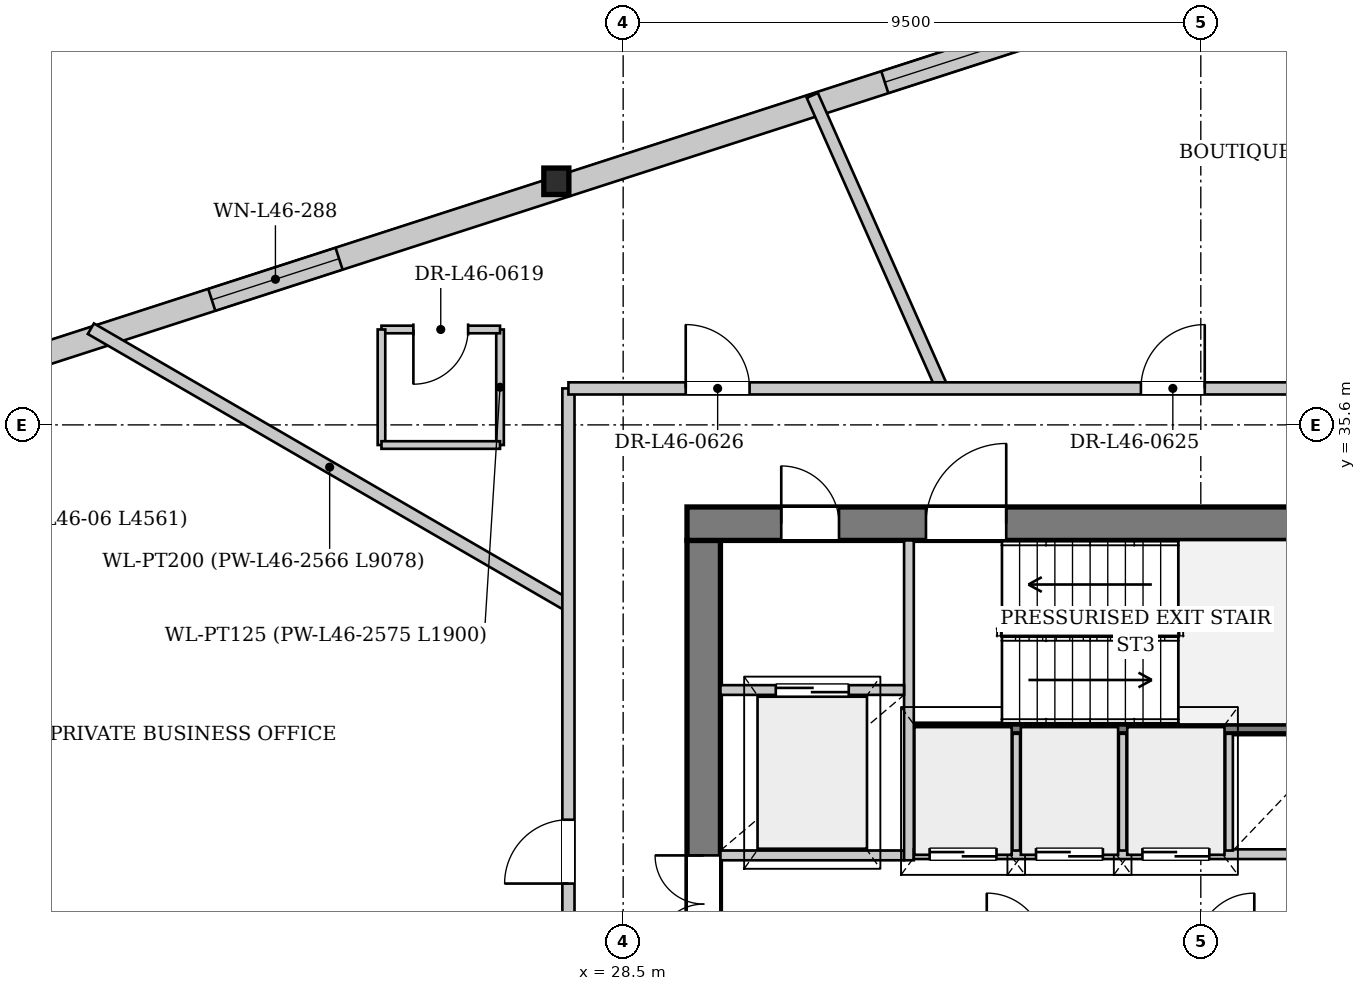
"""IFC4 building model, lengths in metres.
Left out: names, types, materials, properties, quantities, classifications, styles, units other than length and angle.
Written with IfcOpenShell. Run it as: python <this file> out.ifc"""

import sys

from ifc_helpers import new_model, si_unit, direction, frame, frame_2d, origin, origin_2d, place, context, subcontext, project, spatial, rectangle, i_section, extrude, source, transform, mapped, element, fill, save


model = new_model("IFC4")
c1 = context("Model", 3, precision=1e-05, world=origin(), true_north=direction((0.0, 1.0)))
c2 = subcontext(c1, "Body", "Model", "MODEL_VIEW")
j1 = project(units=[si_unit("LENGTHUNIT", "METRE"), si_unit("PLANEANGLEUNIT", "RADIAN")], contexts=[c1])
p1 = place(None, origin())
s1 = spatial("IfcSite", under=j1, at=p1, CompositionType="ELEMENT")
p2 = place(p1, origin())
s2 = spatial("IfcBuilding", under=s1, at=p2, CompositionType="ELEMENT")
p3 = place(p2, frame((0.0, 0.0, 175.0)))
s3 = spatial("IfcBuildingStorey", under=s2, at=p3, CompositionType="ELEMENT", Elevation=175.0)
m1 = source(origin(), c2, "Body", "SweptSolid", [
    extrude(i_section(OverallWidth=0.412, OverallDepth=0.435, WebThickness=0.031, FlangeThickness=0.05, at=origin_2d()), origin(), (0.0, 0.0, 1.0), 3.398),
])
p4 = place(p3, frame((27.496, 39.719, 0.0), z_axis=(-0.055972402112, -0.066390885175, 0.996222535665), x_axis=(0.764546308451, -0.644568803337, 0.0)))
e1 = element("IfcColumn", 1, at=p4, inside=s3, PredefinedType="COLUMN", context=c2, shape_type="MappedRepresentation", body=[
    mapped(m1, transform((0.0, 0.0, 0.0), x_axis=(1.0, 0.0, 0.0), y_axis=(0.0, 1.0, 0.0), z_axis=(0.0, 0.0, 1.0), scale=1.0)),
])
p5 = place(p3, frame((22.161, 15.73, 0.0), z_axis=(0.0, 0.0, 1.0), x_axis=(-0.401254224354, 0.915966728347, 0.0)))
e2 = element("IfcWall", 2, at=p5, inside=s3, PredefinedType="SOLIDWALL", context=c2, shape_type="SweptSolid", body=[
    extrude(rectangle(XDim=17.854, YDim=0.32, at=frame_2d((8.927, 0.0))), origin(), (0.0, 0.0, 1.0), 2.722),
])
p6 = place(p5, frame((4.963, 0.0, 0.0)))
e3 = element("IfcOpeningElement", 3, at=p6, cuts=e2, PredefinedType="OPENING", context=c2, shape_type="SweptSolid", body=[
    extrude(rectangle(XDim=1.5, YDim=2.3, at=frame_2d((0.75, 1.15))), frame((0.0, 0.17, 0.0), z_axis=(0.0, -1.0, 0.0), x_axis=(1.0, 0.0, 0.0)), (0.0, 0.0, 1.0), 0.34),
])
p7 = place(p5, frame((11.912, 0.0, 0.252)))
e4 = element("IfcOpeningElement", 4, at=p7, cuts=e2, PredefinedType="OPENING", context=c2, shape_type="SweptSolid", body=[
    extrude(rectangle(XDim=2.6, YDim=2.35, at=frame_2d((1.3, 1.175))), frame((0.0, 0.17, 0.0), z_axis=(0.0, -1.0, 0.0), x_axis=(1.0, 0.0, 0.0)), (0.0, 0.0, 1.0), 0.34),
])
p8 = place(p3, frame((16.706, 36.031, 0.0), z_axis=(0.0, 0.0, 1.0), x_axis=(0.95149688804, 0.307658369056, 0.0)))
e5 = element("IfcWall", 5, at=p8, inside=s3, PredefinedType="SOLIDWALL", context=c2, shape_type="SweptSolid", body=[
    extrude(rectangle(XDim=22.803, YDim=0.38, at=frame_2d((11.402, 0.0))), origin(), (0.0, 0.0, 1.0), 2.722),
])
p9 = place(p8, frame((5.285, 0.0, 0.352)))
e6 = element("IfcOpeningElement", 6, at=p9, cuts=e5, PredefinedType="OPENING", context=c2, shape_type="SweptSolid", body=[
    extrude(rectangle(XDim=2.2, YDim=2.25, at=frame_2d((1.1, 1.125))), frame((0.0, 0.2, 0.0), z_axis=(0.0, -1.0, 0.0), x_axis=(1.0, 0.0, 0.0)), (0.0, 0.0, 1.0), 0.4),
])
p10 = place(p8, frame((16.918, 0.0, 0.352)))
e7 = element("IfcOpeningElement", 7, at=p10, cuts=e5, PredefinedType="OPENING", context=c2, shape_type="SweptSolid", body=[
    extrude(rectangle(XDim=2.2, YDim=2.25, at=frame_2d((1.1, 1.125))), frame((0.0, 0.2, 0.0), z_axis=(0.0, -1.0, 0.0), x_axis=(1.0, 0.0, 0.0)), (0.0, 0.0, 1.0), 0.4),
])
p11 = place(p3, frame((29.825, 19.5, 0.0), z_axis=(0.0, 0.0, 1.0), x_axis=(0.0, 1.0, 0.0)))
e8 = element("IfcWall", 8, at=p11, inside=s3, PredefinedType="SHEAR", context=c2, shape_type="SweptSolid", body=[
    extrude(rectangle(XDim=14.2, YDim=0.55, at=frame_2d((7.1, 0.0))), origin(), (0.0, 0.0, 1.0), 3.33),
])
p12 = place(p11, frame((7.42, 0.0, 0.0)))
e9 = element("IfcOpeningElement", 9, at=p12, cuts=e8, PredefinedType="OPENING", context=c2, shape_type="SweptSolid", body=[
    extrude(rectangle(XDim=1.6, YDim=2.2, at=frame_2d((0.8, 1.1))), frame((0.0, 0.285, 0.0), z_axis=(0.0, -1.0, 0.0), x_axis=(1.0, 0.0, 0.0)), (0.0, 0.0, 1.0), 0.57),
])
p13 = place(p3, frame((29.55, 33.975, 0.0), z_axis=(0.0, 0.0, 1.0), x_axis=(1.0, 0.0, 0.0)))
e10 = element("IfcWall", 10, at=p13, inside=s3, PredefinedType="SHEAR", context=c2, shape_type="SweptSolid", body=[
    extrude(rectangle(XDim=16.9, YDim=0.55, at=frame_2d((8.45, 0.0))), origin(), (0.0, 0.0, 1.0), 3.33),
])
p14 = place(p13, frame((1.55, 0.0, 0.0)))
e11 = element("IfcOpeningElement", 11, at=p14, cuts=e10, PredefinedType="OPENING", context=c2, shape_type="SweptSolid", body=[
    extrude(rectangle(XDim=0.95, YDim=2.1, at=frame_2d((0.475, 1.05))), frame((0.0, 0.285, 0.0), z_axis=(0.0, -1.0, 0.0), x_axis=(1.0, 0.0, 0.0)), (0.0, 0.0, 1.0), 0.57),
])
p15 = place(p13, frame((3.93, 0.0, 0.0)))
e12 = element("IfcOpeningElement", 12, at=p15, cuts=e10, PredefinedType="OPENING", context=c2, shape_type="SweptSolid", body=[
    extrude(rectangle(XDim=1.32, YDim=2.2, at=frame_2d((0.66, 1.1))), frame((0.0, 0.285, 0.0), z_axis=(0.0, -1.0, 0.0), x_axis=(1.0, 0.0, 0.0)), (0.0, 0.0, 1.0), 0.57),
])
p16 = place(p3, frame((33.28, 30.6, 0.0), z_axis=(0.0, 0.0, 1.0), x_axis=(1.0, 0.0, 0.0)))
e13 = element("IfcWall", 13, at=p16, inside=s3, PredefinedType="PARTITIONING", context=c2, shape_type="SweptSolid", body=[
    extrude(rectangle(XDim=7.3, YDim=0.16, at=frame_2d((3.65, 0.0))), origin(), (0.0, 0.0, 1.0), 3.33),
])
p17 = place(p3, frame((30.1, 28.52, 0.0), z_axis=(0.0, 0.0, 1.0), x_axis=(1.0, 0.0, 0.0)))
e14 = element("IfcWall", 14, at=p17, inside=s3, PredefinedType="PARTITIONING", context=c2, shape_type="SweptSolid", body=[
    extrude(rectangle(XDim=3.02, YDim=0.16, at=frame_2d((1.51, 0.0))), origin(), (0.0, 0.0, 1.0), 3.33),
])
p18 = place(p3, frame((33.2, 28.44, 0.0), z_axis=(0.0, 0.0, 1.0), x_axis=(0.0, 1.0, 0.0)))
e15 = element("IfcWall", 15, at=p18, inside=s3, PredefinedType="PARTITIONING", context=c2, shape_type="SweptSolid", body=[
    extrude(rectangle(XDim=5.26, YDim=0.16, at=frame_2d((2.63, 0.0))), origin(), (0.0, 0.0, 1.0), 3.33),
])
p19 = place(p3, frame((30.1, 31.24, 0.0), z_axis=(0.0, 0.0, 1.0), x_axis=(1.0, 0.0, 0.0)))
e16 = element("IfcWall", 16, at=p19, inside=s3, PredefinedType="PARTITIONING", context=c2, shape_type="SweptSolid", body=[
    extrude(rectangle(XDim=3.02, YDim=0.16, at=frame_2d((1.51, 0.0))), origin(), (0.0, 0.0, 1.0), 3.33),
])
p20 = place(p19, frame((0.91, 0.0, 0.0)))
e17 = element("IfcOpeningElement", 17, at=p20, cuts=e16, PredefinedType="OPENING", context=c2, shape_type="SweptSolid", body=[
    extrude(rectangle(XDim=1.2, YDim=2.2, at=frame_2d((0.6, 1.1))), frame((0.0, 0.09, 0.0), z_axis=(0.0, -1.0, 0.0), x_axis=(1.0, 0.0, 0.0)), (0.0, 0.0, 1.0), 0.18),
])
p21 = place(p3, frame((33.28, 28.54, 0.0), z_axis=(0.0, 0.0, 1.0), x_axis=(1.0, 0.0, 0.0)))
e18 = element("IfcWall", 18, at=p21, inside=s3, PredefinedType="PARTITIONING", context=c2, shape_type="SweptSolid", body=[
    extrude(rectangle(XDim=12.62, YDim=0.16, at=frame_2d((6.31, 0.0))), origin(), (0.0, 0.0, 1.0), 3.33),
])
p22 = place(p21, frame((0.26, 0.0, 0.0)))
e19 = element("IfcOpeningElement", 19, at=p22, cuts=e18, PredefinedType="OPENING", context=c2, shape_type="SweptSolid", body=[
    extrude(rectangle(XDim=1.1, YDim=2.2, at=frame_2d((0.55, 1.1))), frame((0.0, 0.09, 0.0), z_axis=(0.0, -1.0, 0.0), x_axis=(1.0, 0.0, 0.0)), (0.0, 0.0, 1.0), 0.18),
])
p23 = place(p21, frame((2.01, 0.0, 0.0)))
e20 = element("IfcOpeningElement", 20, at=p23, cuts=e18, PredefinedType="OPENING", context=c2, shape_type="SweptSolid", body=[
    extrude(rectangle(XDim=1.1, YDim=2.2, at=frame_2d((0.55, 1.1))), frame((0.0, 0.09, 0.0), z_axis=(0.0, -1.0, 0.0), x_axis=(1.0, 0.0, 0.0)), (0.0, 0.0, 1.0), 0.18),
])
p24 = place(p21, frame((3.76, 0.0, 0.0)))
e21 = element("IfcOpeningElement", 21, at=p24, cuts=e18, PredefinedType="OPENING", context=c2, shape_type="SweptSolid", body=[
    extrude(rectangle(XDim=1.1, YDim=2.2, at=frame_2d((0.55, 1.1))), frame((0.0, 0.09, 0.0), z_axis=(0.0, -1.0, 0.0), x_axis=(1.0, 0.0, 0.0)), (0.0, 0.0, 1.0), 0.18),
])
for number, where, z_axis, x_axis in (
    (22, (34.965, 28.6, 0.0), (0.0, 0.0, 1.0), (0.0, 1.0, 0.0)),
    (23, (36.715, 28.6, 0.0), (0.0, 0.0, 1.0), (0.0, 1.0, 0.0)),
    (24, (38.465, 28.6, 0.0), (0.0, 0.0, 1.0), (0.0, 1.0, 0.0)),
):
    element("IfcWall", number, at=place(p3, frame(where, z_axis=z_axis, x_axis=x_axis)), inside=s3, PredefinedType="PARTITIONING", context=c2, shape_type="SweptSolid", body=[
        extrude(rectangle(XDim=1.92, YDim=0.125, at=frame_2d((0.96, 0.0))), origin(), (0.0, 0.0, 1.0), 3.33),
    ])
p25 = place(p3, frame((27.6, 32.629, 0.0), z_axis=(0.0, 0.0, 1.0), x_axis=(-0.865149978603, 0.501513224674, 0.0)))
e25 = element("IfcWall", 25, at=p25, inside=s3, PredefinedType="PARTITIONING", context=c2, shape_type="SweptSolid", body=[
    extrude(rectangle(XDim=9.078, YDim=0.2, at=frame_2d((4.539, 0.0))), origin(), (0.0, 0.0, 1.0), 3.33),
])
p26 = place(p3, frame((33.746, 36.2, 0.0), z_axis=(0.0, 0.0, 1.0), x_axis=(-0.40512810206, 0.914259930721, 0.0)))
e26 = element("IfcWall", 26, at=p26, inside=s3, PredefinedType="PARTITIONING", context=c2, shape_type="SweptSolid", body=[
    extrude(rectangle(XDim=5.27, YDim=0.2, at=frame_2d((2.635, 0.0))), origin(), (0.0, 0.0, 1.0), 3.33),
])
p27 = place(p3, frame((26.475, 35.269, 0.0), z_axis=(0.0, 0.0, 1.0), x_axis=(0.0, 1.0, 0.0)))
e27 = element("IfcWall", 27, at=p27, inside=s3, PredefinedType="PARTITIONING", context=c2, shape_type="SweptSolid", body=[
    extrude(rectangle(XDim=1.9, YDim=0.125, at=frame_2d((0.95, 0.0))), origin(), (0.0, 0.0, 1.0), 3.33),
])
p28 = place(p3, frame((26.475, 37.169, 0.0), z_axis=(0.0, 0.0, 1.0), x_axis=(-1.0, 0.0, 0.0)))
e28 = element("IfcWall", 28, at=p28, inside=s3, PredefinedType="PARTITIONING", context=c2, shape_type="SweptSolid", body=[
    extrude(rectangle(XDim=1.95, YDim=0.125, at=frame_2d((0.975, 0.0))), origin(), (0.0, 0.0, 1.0), 3.33),
])
p29 = place(p28, frame((0.525, 0.0, 0.0)))
e29 = element("IfcOpeningElement", 29, at=p29, cuts=e28, PredefinedType="OPENING", context=c2, shape_type="SweptSolid", body=[
    extrude(rectangle(XDim=0.9, YDim=2.1, at=frame_2d((0.45, 1.05))), frame((0.0, 0.073, 0.0), z_axis=(0.0, -1.0, 0.0), x_axis=(1.0, 0.0, 0.0)), (0.0, 0.0, 1.0), 0.145),
])
p30 = place(p3, frame((24.525, 37.169, 0.0), z_axis=(0.0, 0.0, 1.0), x_axis=(0.0, -1.0, 0.0)))
e30 = element("IfcWall", 30, at=p30, inside=s3, PredefinedType="PARTITIONING", context=c2, shape_type="SweptSolid", body=[
    extrude(rectangle(XDim=1.9, YDim=0.125, at=frame_2d((0.95, 0.0))), origin(), (0.0, 0.0, 1.0), 3.33),
])
p31 = place(p3, frame((24.525, 35.269, 0.0), z_axis=(0.0, 0.0, 1.0), x_axis=(1.0, 0.0, 0.0)))
e31 = element("IfcWall", 31, at=p31, inside=s3, PredefinedType="PARTITIONING", context=c2, shape_type="SweptSolid", body=[
    extrude(rectangle(XDim=1.95, YDim=0.125, at=frame_2d((0.975, 0.0))), origin(), (0.0, 0.0, 1.0), 3.33),
])
p32 = place(p3, frame((27.6, 17.0, 0.0), z_axis=(0.0, 0.0, 1.0), x_axis=(0.0, 1.0, 0.0)))
e32 = element("IfcWall", 32, at=p32, inside=s3, PredefinedType="PARTITIONING", context=c2, shape_type="SweptSolid", body=[
    extrude(rectangle(XDim=19.2, YDim=0.2, at=frame_2d((9.6, 0.0))), origin(), (0.0, 0.0, 1.0), 3.33),
])
p33 = place(p32, frame((11.057, 0.0, 0.0)))
e33 = element("IfcOpeningElement", 33, at=p33, cuts=e32, PredefinedType="OPENING", context=c2, shape_type="SweptSolid", body=[
    extrude(rectangle(XDim=1.05, YDim=2.2, at=frame_2d((0.525, 1.1))), frame((0.0, 0.11, 0.0), z_axis=(0.0, -1.0, 0.0), x_axis=(1.0, 0.0, 0.0)), (0.0, 0.0, 1.0), 0.22),
])
p34 = place(p32, frame((2.94, 0.0, 0.0)))
e34 = element("IfcOpeningElement", 34, at=p34, cuts=e32, PredefinedType="OPENING", context=c2, shape_type="SweptSolid", body=[
    extrude(rectangle(XDim=1.05, YDim=2.2, at=frame_2d((0.525, 1.1))), frame((0.0, 0.11, 0.0), z_axis=(0.0, -1.0, 0.0), x_axis=(1.0, 0.0, 0.0)), (0.0, 0.0, 1.0), 0.22),
])
p35 = place(p3, frame((27.6, 36.2, 0.0), z_axis=(0.0, 0.0, 1.0), x_axis=(1.0, 0.0, 0.0)))
e35 = element("IfcWall", 35, at=p35, inside=s3, PredefinedType="PARTITIONING", context=c2, shape_type="SweptSolid", body=[
    extrude(rectangle(XDim=13.4, YDim=0.2, at=frame_2d((6.7, 0.0))), origin(), (0.0, 0.0, 1.0), 3.33),
])
p36 = place(p35, frame((9.415, 0.0, 0.0)))
e36 = element("IfcOpeningElement", 36, at=p36, cuts=e35, PredefinedType="OPENING", context=c2, shape_type="SweptSolid", body=[
    extrude(rectangle(XDim=1.05, YDim=2.2, at=frame_2d((0.525, 1.1))), frame((0.0, 0.11, 0.0), z_axis=(0.0, -1.0, 0.0), x_axis=(1.0, 0.0, 0.0)), (0.0, 0.0, 1.0), 0.22),
])
p37 = place(p35, frame((1.929, 0.0, 0.0)))
e37 = element("IfcOpeningElement", 37, at=p37, cuts=e35, PredefinedType="OPENING", context=c2, shape_type="SweptSolid", body=[
    extrude(rectangle(XDim=1.05, YDim=2.2, at=frame_2d((0.525, 1.1))), frame((0.0, 0.11, 0.0), z_axis=(0.0, -1.0, 0.0), x_axis=(1.0, 0.0, 0.0)), (0.0, 0.0, 1.0), 0.22),
])
m2 = source(origin(), c2, "Body", "SweptSolid", [
    extrude(rectangle(XDim=2.2, YDim=2.25, at=frame_2d((1.1, 1.125))), frame((0.0, 0.03, 0.0), z_axis=(0.0, -1.0, 0.0), x_axis=(1.0, 0.0, 0.0)), (0.0, 0.0, 1.0), 0.06),
])
p38 = place(p9, origin())
e38 = element("IfcWindow", 38, at=p38, inside=s3, PartitioningType="SINGLE_PANEL", PredefinedType="WINDOW", context=c2, shape_type="MappedRepresentation", body=[
    mapped(m2, transform((0.0, 0.0, 0.0), x_axis=(1.0, 0.0, 0.0), y_axis=(0.0, 1.0, 0.0), z_axis=(0.0, 0.0, 1.0), scale=1.0)),
])
fill(e6, e38)
p39 = place(p10, origin())
e39 = element("IfcWindow", 39, at=p39, inside=s3, PartitioningType="SINGLE_PANEL", PredefinedType="WINDOW", context=c2, shape_type="MappedRepresentation", body=[
    mapped(m2, transform((0.0, 0.0, 0.0), x_axis=(1.0, 0.0, 0.0), y_axis=(0.0, 1.0, 0.0), z_axis=(0.0, 0.0, 1.0), scale=1.0)),
])
fill(e7, e39)
m3 = source(origin(), c2, "Body", "SweptSolid", [
    extrude(rectangle(XDim=1.6, YDim=2.2, at=frame_2d((0.8, 1.1))), frame((0.0, 0.025, 0.0), z_axis=(0.0, -1.0, 0.0), x_axis=(1.0, 0.0, 0.0)), (0.0, 0.0, 1.0), 0.05),
])
p40 = place(p12, origin())
e40 = element("IfcDoor", 40, at=p40, inside=s3, OperationType="DOUBLE_DOOR_SINGLE_SWING", PredefinedType="DOOR", context=c2, shape_type="MappedRepresentation", body=[
    mapped(m3, transform((0.0, 0.0, 0.0), x_axis=(1.0, 0.0, 0.0), y_axis=(0.0, 1.0, 0.0), z_axis=(0.0, 0.0, 1.0), scale=1.0)),
])
fill(e9, e40)
m4 = source(origin(), c2, "Body", "SweptSolid", [
    extrude(rectangle(XDim=0.95, YDim=2.1, at=frame_2d((0.475, 1.05))), frame((0.0, 0.025, 0.0), z_axis=(0.0, -1.0, 0.0), x_axis=(1.0, 0.0, 0.0)), (0.0, 0.0, 1.0), 0.05),
])
p41 = place(p14, origin())
e41 = element("IfcDoor", 41, at=p41, inside=s3, OperationType="SINGLE_SWING_LEFT", PredefinedType="DOOR", context=c2, shape_type="MappedRepresentation", body=[
    mapped(m4, transform((0.0, 0.0, 0.0), x_axis=(1.0, 0.0, 0.0), y_axis=(0.0, 1.0, 0.0), z_axis=(0.0, 0.0, 1.0), scale=1.0)),
])
fill(e11, e41)
m5 = source(origin(), c2, "Body", "SweptSolid", [
    extrude(rectangle(XDim=1.32, YDim=2.2, at=frame_2d((0.66, 1.1))), frame((0.0, 0.025, 0.0), z_axis=(0.0, -1.0, 0.0), x_axis=(1.0, 0.0, 0.0)), (0.0, 0.0, 1.0), 0.05),
])
p42 = place(p15, origin())
e42 = element("IfcDoor", 42, at=p42, inside=s3, OperationType="SINGLE_SWING_RIGHT", PredefinedType="DOOR", context=c2, shape_type="MappedRepresentation", body=[
    mapped(m5, transform((0.0, 0.0, 0.0), x_axis=(1.0, 0.0, 0.0), y_axis=(0.0, 1.0, 0.0), z_axis=(0.0, 0.0, 1.0), scale=1.0)),
])
fill(e12, e42)
m6 = source(origin(), c2, "Body", "SweptSolid", [
    extrude(rectangle(XDim=1.2, YDim=2.2, at=frame_2d((0.6, 1.1))), frame((0.0, 0.025, 0.0), z_axis=(0.0, -1.0, 0.0), x_axis=(1.0, 0.0, 0.0)), (0.0, 0.0, 1.0), 0.05),
])
p43 = place(p20, origin())
e43 = element("IfcDoor", 43, at=p43, inside=s3, OperationType="DOUBLE_DOOR_SLIDING", PredefinedType="DOOR", context=c2, shape_type="MappedRepresentation", body=[
    mapped(m6, transform((0.0, 0.0, 0.0), x_axis=(1.0, 0.0, 0.0), y_axis=(0.0, 1.0, 0.0), z_axis=(0.0, 0.0, 1.0), scale=1.0)),
])
fill(e17, e43)
m7 = source(origin(), c2, "Body", "SweptSolid", [
    extrude(rectangle(XDim=1.1, YDim=2.2, at=frame_2d((0.55, 1.1))), frame((0.0, 0.025, 0.0), z_axis=(0.0, -1.0, 0.0), x_axis=(1.0, 0.0, 0.0)), (0.0, 0.0, 1.0), 0.05),
])
p44 = place(p22, origin())
e44 = element("IfcDoor", 44, at=p44, inside=s3, OperationType="DOUBLE_DOOR_SLIDING", PredefinedType="DOOR", context=c2, shape_type="MappedRepresentation", body=[
    mapped(m7, transform((0.0, 0.0, 0.0), x_axis=(1.0, 0.0, 0.0), y_axis=(0.0, 1.0, 0.0), z_axis=(0.0, 0.0, 1.0), scale=1.0)),
])
fill(e19, e44)
p45 = place(p23, origin())
e45 = element("IfcDoor", 45, at=p45, inside=s3, OperationType="DOUBLE_DOOR_SLIDING", PredefinedType="DOOR", context=c2, shape_type="MappedRepresentation", body=[
    mapped(m7, transform((0.0, 0.0, 0.0), x_axis=(1.0, 0.0, 0.0), y_axis=(0.0, 1.0, 0.0), z_axis=(0.0, 0.0, 1.0), scale=1.0)),
])
fill(e20, e45)
p46 = place(p24, origin())
e46 = element("IfcDoor", 46, at=p46, inside=s3, OperationType="DOUBLE_DOOR_SLIDING", PredefinedType="DOOR", context=c2, shape_type="MappedRepresentation", body=[
    mapped(m7, transform((0.0, 0.0, 0.0), x_axis=(1.0, 0.0, 0.0), y_axis=(0.0, 1.0, 0.0), z_axis=(0.0, 0.0, 1.0), scale=1.0)),
])
fill(e21, e46)
m8 = source(origin(), c2, "Body", "SweptSolid", [
    extrude(rectangle(XDim=0.9, YDim=2.1, at=frame_2d((0.45, 1.05))), frame((0.0, 0.025, 0.0), z_axis=(0.0, -1.0, 0.0), x_axis=(1.0, 0.0, 0.0)), (0.0, 0.0, 1.0), 0.05),
])
p47 = place(p29, origin())
e47 = element("IfcDoor", 47, at=p47, inside=s3, OperationType="SINGLE_SWING_RIGHT", PredefinedType="DOOR", context=c2, shape_type="MappedRepresentation", body=[
    mapped(m8, transform((0.0, 0.0, 0.0), x_axis=(1.0, 0.0, 0.0), y_axis=(0.0, 1.0, 0.0), z_axis=(0.0, 0.0, 1.0), scale=1.0)),
])
fill(e29, e47)
m9 = source(origin(), c2, "Body", "SweptSolid", [
    extrude(rectangle(XDim=1.05, YDim=2.2, at=frame_2d((0.525, 1.1))), frame((0.0, 0.025, 0.0), z_axis=(0.0, -1.0, 0.0), x_axis=(1.0, 0.0, 0.0)), (0.0, 0.0, 1.0), 0.05),
])
p48 = place(p33, origin())
e48 = element("IfcDoor", 48, at=p48, inside=s3, OperationType="SINGLE_SWING_LEFT", PredefinedType="DOOR", context=c2, shape_type="MappedRepresentation", body=[
    mapped(m9, transform((0.0, 0.0, 0.0), x_axis=(1.0, 0.0, 0.0), y_axis=(0.0, 1.0, 0.0), z_axis=(0.0, 0.0, 1.0), scale=1.0)),
])
fill(e33, e48)
p49 = place(p36, origin())
e49 = element("IfcDoor", 49, at=p49, inside=s3, OperationType="SINGLE_SWING_RIGHT", PredefinedType="DOOR", context=c2, shape_type="MappedRepresentation", body=[
    mapped(m9, transform((0.0, 0.0, 0.0), x_axis=(1.0, 0.0, 0.0), y_axis=(0.0, 1.0, 0.0), z_axis=(0.0, 0.0, 1.0), scale=1.0)),
])
fill(e36, e49)
p50 = place(p37, origin())
e50 = element("IfcDoor", 50, at=p50, inside=s3, OperationType="SINGLE_SWING_LEFT", PredefinedType="DOOR", context=c2, shape_type="MappedRepresentation", body=[
    mapped(m9, transform((0.0, 0.0, 0.0), x_axis=(1.0, 0.0, 0.0), y_axis=(0.0, 1.0, 0.0), z_axis=(0.0, 0.0, 1.0), scale=1.0)),
])
fill(e37, e50)
save(model, sys.argv[1])
